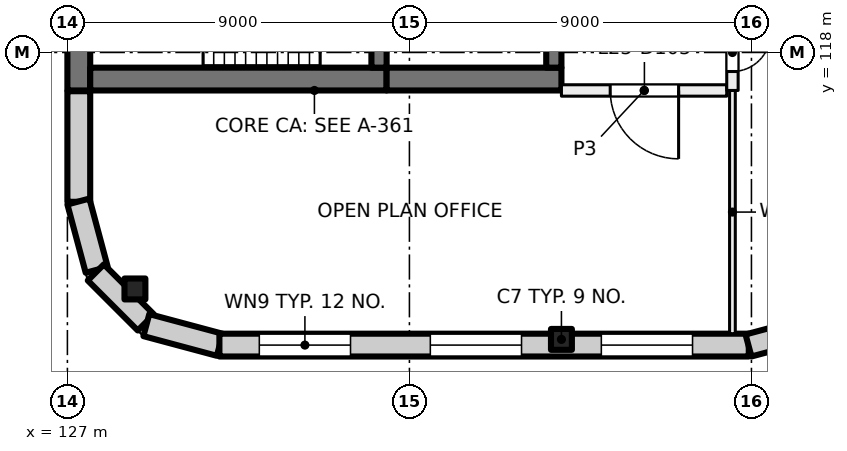
"""IFC4 building model, lengths in metres.
Left out: names, types, materials, properties, quantities, classifications, styles, units other than length and angle.
Written with IfcOpenShell. Run it as: python <this file> out.ifc"""

import sys

from ifc_helpers import new_model, si_unit, direction, frame, frame_2d, origin, origin_2d, place, context, subcontext, project, spatial, rectangle, extrude, element, fill, save


model = new_model("IFC4")
c1 = context("Model", 3, precision=1e-05, world=origin(), true_north=direction((0.0, 1.0)))
c2 = subcontext(c1, "Body", "Model", "MODEL_VIEW")
j1 = project(units=[si_unit("LENGTHUNIT", "METRE"), si_unit("PLANEANGLEUNIT", "RADIAN")], contexts=[c1])
p1 = place(None, origin())
s1 = spatial("IfcSite", under=j1, at=p1, CompositionType="ELEMENT")
p2 = place(p1, origin())
s2 = spatial("IfcBuilding", under=s1, at=p2, CompositionType="ELEMENT")
p3 = place(p2, frame((0.0, 0.0, 109.0)))
s3 = spatial("IfcBuildingStorey", under=s2, at=p3, CompositionType="ELEMENT", Elevation=109.0)
for number, where, z_axis, x_axis in (
    (1, (128.777, 111.777, 0.0), (0.0, 0.0, 1.0), (1.0, 0.0, 0.0)),
    (2, (140.0, 110.45, 0.0), (0.0, 0.0, 1.0), (1.0, 0.0, 0.0)),
):
    element("IfcColumn", number, at=place(p3, frame(where, z_axis=z_axis, x_axis=x_axis)), inside=s3, PredefinedType="COLUMN", context=c2, shape_type="SweptSolid", body=[
        extrude(rectangle(XDim=0.55, YDim=0.55, at=origin_2d()), origin(), (0.0, 0.0, 1.0), 4.0),
    ])
p4 = place(p3, frame((127.3, 117.0, 0.0), z_axis=(0.0, 0.0, 1.0), x_axis=(0.0, 1.0, 0.0)))
e3 = element("IfcWall", 3, at=p4, inside=s3, PredefinedType="SHEAR", context=c2, shape_type="SweptSolid", body=[
    extrude(rectangle(XDim=3.8, YDim=0.6, at=frame_2d((1.9, 0.0))), origin(), (0.0, 0.0, 1.0), 4.0),
])
p5 = place(p3, frame((127.6, 117.3, 0.0), z_axis=(0.0, 0.0, 1.0), x_axis=(1.0, 0.0, 0.0)))
e4 = element("IfcWall", 4, at=p5, inside=s3, PredefinedType="SHEAR", context=c2, shape_type="SweptSolid", body=[
    extrude(rectangle(XDim=7.8, YDim=0.6, at=frame_2d((3.9, 0.0))), origin(), (0.0, 0.0, 1.0), 4.0),
])
p6 = place(p3, frame((135.4, 117.3, 0.0), z_axis=(0.0, 0.0, 1.0), x_axis=(1.0, 0.0, 0.0)))
e5 = element("IfcWall", 5, at=p6, inside=s3, PredefinedType="SHEAR", context=c2, shape_type="SweptSolid", body=[
    extrude(rectangle(XDim=4.6, YDim=0.6, at=frame_2d((2.3, 0.0))), origin(), (0.0, 0.0, 1.0), 4.0),
])
p7 = place(p3, frame((135.2, 117.6, 0.0), z_axis=(0.0, 0.0, 1.0), x_axis=(0.0, 1.0, 0.0)))
e6 = element("IfcWall", 6, at=p7, inside=s3, PredefinedType="SHEAR", context=c2, shape_type="SweptSolid", body=[
    extrude(rectangle(XDim=2.8, YDim=0.4, at=frame_2d((1.4, 0.0))), origin(), (0.0, 0.0, 1.0), 4.0),
])
p8 = place(p7, frame((0.9, 0.0, 0.0)))
e7 = element("IfcOpeningElement", 7, at=p8, cuts=e6, PredefinedType="OPENING", context=c2, shape_type="SweptSolid", body=[
    extrude(rectangle(XDim=1.0, YDim=2.1, at=frame_2d((0.5, 1.05))), frame((0.0, 0.21, 0.0), z_axis=(0.0, -1.0, 0.0), x_axis=(1.0, 0.0, 0.0)), (0.0, 0.0, 1.0), 0.42),
])
p9 = place(p3, frame((139.8, 117.6, 0.0), z_axis=(0.0, 0.0, 1.0), x_axis=(0.0, 1.0, 0.0)))
e8 = element("IfcWall", 8, at=p9, inside=s3, PredefinedType="SHEAR", context=c2, shape_type="SweptSolid", body=[
    extrude(rectangle(XDim=8.6, YDim=0.4, at=frame_2d((4.3, 0.0))), origin(), (0.0, 0.0, 1.0), 4.0),
])
p10 = place(p3, frame((127.3, 114.07, 0.0), z_axis=(0.0, 0.0, 1.0), x_axis=(0.0, 1.0, 0.0)))
e9 = element("IfcWall", 9, at=p10, inside=s3, PredefinedType="SOLIDWALL", context=c2, shape_type="SweptSolid", body=[
    extrude(rectangle(XDim=2.91, YDim=0.6, at=frame_2d((1.455, 0.0))), origin(), (0.0, 0.0, 1.0), 3.625),
])
for number, where, z_axis, x_axis in (
    (10, (127.771, 112.281, 0.0), (0.0, 0.0, 1.0), (-0.259, 0.966, 0.0)),
    (11, (129.064, 110.896, 0.0), (0.0, 0.0, 1.0), (-0.707, 0.707, 0.0)),
):
    element("IfcWall", number, at=place(p3, frame(where, z_axis=z_axis, x_axis=x_axis)), inside=s3, PredefinedType="SOLIDWALL", context=c2, shape_type="SweptSolid", body=[
        extrude(rectangle(XDim=1.861, YDim=0.6, at=frame_2d((0.93, 0.0))), origin(), (0.0, 0.0, 1.0), 3.625),
    ])
p11 = place(p3, frame((131.01, 110.308, 0.0), z_axis=(0.0, 0.0, 1.0), x_axis=(-0.965920269068, 0.258839784042, 0.0)))
e12 = element("IfcWall", 12, at=p11, inside=s3, PredefinedType="SOLIDWALL", context=c2, shape_type="SweptSolid", body=[
    extrude(rectangle(XDim=2.0, YDim=0.6, at=frame_2d((1.0, 0.0))), origin(), (0.0, 0.0, 1.0), 3.625),
])
p12 = place(p3, frame((144.93, 110.3, 0.0), z_axis=(0.0, 0.0, 1.0), x_axis=(-1.0, 0.0, 0.0)))
e13 = element("IfcWall", 13, at=p12, inside=s3, PredefinedType="SOLIDWALL", context=c2, shape_type="SweptSolid", body=[
    extrude(rectangle(XDim=13.93, YDim=0.6, at=frame_2d((6.965, 0.0))), origin(), (0.0, 0.0, 1.0), 3.625),
])
p13 = place(p12, frame((1.48, 0.0, 0.9)))
e14 = element("IfcOpeningElement", 14, at=p13, cuts=e13, PredefinedType="OPENING", context=c2, shape_type="SweptSolid", body=[
    extrude(rectangle(XDim=2.4, YDim=2.4, at=frame_2d((1.2, 1.2))), frame((0.0, 0.31, 0.0), z_axis=(0.0, -1.0, 0.0), x_axis=(1.0, 0.0, 0.0)), (0.0, 0.0, 1.0), 0.62),
])
p14 = place(p12, frame((5.98, 0.0, 0.9)))
e15 = element("IfcOpeningElement", 15, at=p14, cuts=e13, PredefinedType="OPENING", context=c2, shape_type="SweptSolid", body=[
    extrude(rectangle(XDim=2.4, YDim=2.4, at=frame_2d((1.2, 1.2))), frame((0.0, 0.31, 0.0), z_axis=(0.0, -1.0, 0.0), x_axis=(1.0, 0.0, 0.0)), (0.0, 0.0, 1.0), 0.62),
])
p15 = place(p12, frame((10.48, 0.0, 0.9)))
e16 = element("IfcOpeningElement", 16, at=p15, cuts=e13, PredefinedType="OPENING", context=c2, shape_type="SweptSolid", body=[
    extrude(rectangle(XDim=2.4, YDim=2.4, at=frame_2d((1.2, 1.2))), frame((0.0, 0.31, 0.0), z_axis=(0.0, -1.0, 0.0), x_axis=(1.0, 0.0, 0.0)), (0.0, 0.0, 1.0), 0.62),
])
p16 = place(p3, frame((146.719, 110.771, 0.0), z_axis=(0.0, 0.0, 1.0), x_axis=(-0.965938094805, -0.258773254036, 0.0)))
e17 = element("IfcWall", 17, at=p16, inside=s3, PredefinedType="SOLIDWALL", context=c2, shape_type="SweptSolid", body=[
    extrude(rectangle(XDim=1.861, YDim=0.6, at=frame_2d((0.93, 0.0))), origin(), (0.0, 0.0, 1.0), 3.625),
])
p17 = place(p3, frame((144.35, 117.0, 0.0), z_axis=(0.0, 0.0, 1.0), x_axis=(-1.0, 0.0, 0.0)))
e18 = element("IfcWall", 18, at=p17, inside=s3, PredefinedType="PARTITIONING", context=c2, shape_type="SweptSolid", body=[
    extrude(rectangle(XDim=4.35, YDim=0.3, at=frame_2d((2.175, 0.0))), origin(), (0.0, 0.0, 1.0), 3.625),
])
p18 = place(p17, frame((1.267, 0.0, 0.0)))
e19 = element("IfcOpeningElement", 19, at=p18, cuts=e18, PredefinedType="OPENING", context=c2, shape_type="SweptSolid", body=[
    extrude(rectangle(XDim=1.8, YDim=2.1, at=frame_2d((0.9, 1.05))), frame((0.0, 0.16, 0.0), z_axis=(0.0, -1.0, 0.0), x_axis=(1.0, 0.0, 0.0)), (0.0, 0.0, 1.0), 0.32),
])
p19 = place(p3, frame((144.5, 117.0, 0.0), z_axis=(0.0, 0.0, 1.0), x_axis=(0.0, -1.0, 0.0)))
e20 = element("IfcWall", 20, at=p19, inside=s3, PredefinedType="PARTITIONING", context=c2, shape_type="SweptSolid", body=[
    extrude(rectangle(XDim=6.4, YDim=0.15, at=frame_2d((3.2, 0.0))), origin(), (0.0, 0.0, 1.0), 3.625),
])
p20 = place(p3, frame((144.5, 139.0, 0.0), z_axis=(0.0, 0.0, 1.0), x_axis=(0.0, -1.0, 0.0)))
e21 = element("IfcWall", 21, at=p20, inside=s3, PredefinedType="PARTITIONING", context=c2, shape_type="SweptSolid", body=[
    extrude(rectangle(XDim=22.0, YDim=0.3, at=frame_2d((11.0, 0.0))), origin(), (0.0, 0.0, 1.0), 3.625),
])
p21 = place(p20, frame((20.501, 0.0, 0.0)))
e22 = element("IfcOpeningElement", 22, at=p21, cuts=e21, PredefinedType="OPENING", context=c2, shape_type="SweptSolid", body=[
    extrude(rectangle(XDim=1.0, YDim=2.1, at=frame_2d((0.5, 1.05))), frame((0.0, 0.16, 0.0), z_axis=(0.0, -1.0, 0.0), x_axis=(1.0, 0.0, 0.0)), (0.0, 0.0, 1.0), 0.32),
])
p22 = place(p20, frame((15.0, 0.0, 0.0)))
e23 = element("IfcOpeningElement", 23, at=p22, cuts=e21, PredefinedType="OPENING", context=c2, shape_type="SweptSolid", body=[
    extrude(rectangle(XDim=1.0, YDim=2.1, at=frame_2d((0.5, 1.05))), frame((0.0, 0.16, 0.0), z_axis=(0.0, -1.0, 0.0), x_axis=(1.0, 0.0, 0.0)), (0.0, 0.0, 1.0), 0.32),
])
p23 = place(p20, frame((6.0, 0.0, 0.0)))
e24 = element("IfcOpeningElement", 24, at=p23, cuts=e21, PredefinedType="OPENING", context=c2, shape_type="SweptSolid", body=[
    extrude(rectangle(XDim=1.0, YDim=2.1, at=frame_2d((0.5, 1.05))), frame((0.0, 0.16, 0.0), z_axis=(0.0, -1.0, 0.0), x_axis=(1.0, 0.0, 0.0)), (0.0, 0.0, 1.0), 0.32),
])
p24 = place(p20, frame((0.499, 0.0, 0.0)))
e25 = element("IfcOpeningElement", 25, at=p24, cuts=e21, PredefinedType="OPENING", context=c2, shape_type="SweptSolid", body=[
    extrude(rectangle(XDim=1.0, YDim=2.1, at=frame_2d((0.5, 1.05))), frame((0.0, 0.16, 0.0), z_axis=(0.0, -1.0, 0.0), x_axis=(1.0, 0.0, 0.0)), (0.0, 0.0, 1.0), 0.32),
])
p25 = place(p13, origin())
e26 = element("IfcWindow", 26, at=p25, inside=s3, PartitioningType="SINGLE_PANEL", PredefinedType="WINDOW", context=c2, shape_type="SweptSolid", body=[
    extrude(rectangle(XDim=2.4, YDim=2.4, at=frame_2d((1.2, 1.2))), frame((0.0, 0.03, 0.0), z_axis=(0.0, -1.0, 0.0), x_axis=(1.0, 0.0, 0.0)), (0.0, 0.0, 1.0), 0.06),
])
fill(e14, e26)
p26 = place(p14, origin())
e27 = element("IfcWindow", 27, at=p26, inside=s3, PartitioningType="SINGLE_PANEL", PredefinedType="WINDOW", context=c2, shape_type="SweptSolid", body=[
    extrude(rectangle(XDim=2.4, YDim=2.4, at=frame_2d((1.2, 1.2))), frame((0.0, 0.03, 0.0), z_axis=(0.0, -1.0, 0.0), x_axis=(1.0, 0.0, 0.0)), (0.0, 0.0, 1.0), 0.06),
])
fill(e15, e27)
p27 = place(p15, origin())
e28 = element("IfcWindow", 28, at=p27, inside=s3, PartitioningType="SINGLE_PANEL", PredefinedType="WINDOW", context=c2, shape_type="SweptSolid", body=[
    extrude(rectangle(XDim=2.4, YDim=2.4, at=frame_2d((1.2, 1.2))), frame((0.0, 0.03, 0.0), z_axis=(0.0, -1.0, 0.0), x_axis=(1.0, 0.0, 0.0)), (0.0, 0.0, 1.0), 0.06),
])
fill(e16, e28)
p28 = place(p21, origin())
e29 = element("IfcDoor", 29, at=p28, inside=s3, OperationType="SINGLE_SWING_LEFT", PredefinedType="DOOR", context=c2, shape_type="SweptSolid", body=[
    extrude(rectangle(XDim=1.0, YDim=2.1, at=frame_2d((0.5, 1.05))), frame((0.0, 0.025, 0.0), z_axis=(0.0, -1.0, 0.0), x_axis=(1.0, 0.0, 0.0)), (0.0, 0.0, 1.0), 0.05),
])
fill(e22, e29)
p29 = place(p18, origin())
e30 = element("IfcDoor", 30, at=p29, inside=s3, OperationType="DOUBLE_DOOR_SINGLE_SWING", PredefinedType="DOOR", context=c2, shape_type="SweptSolid", body=[
    extrude(rectangle(XDim=1.8, YDim=2.1, at=frame_2d((0.9, 1.05))), frame((0.0, 0.025, 0.0), z_axis=(0.0, -1.0, 0.0), x_axis=(1.0, 0.0, 0.0)), (0.0, 0.0, 1.0), 0.05),
])
fill(e19, e30)
save(model, sys.argv[1])
